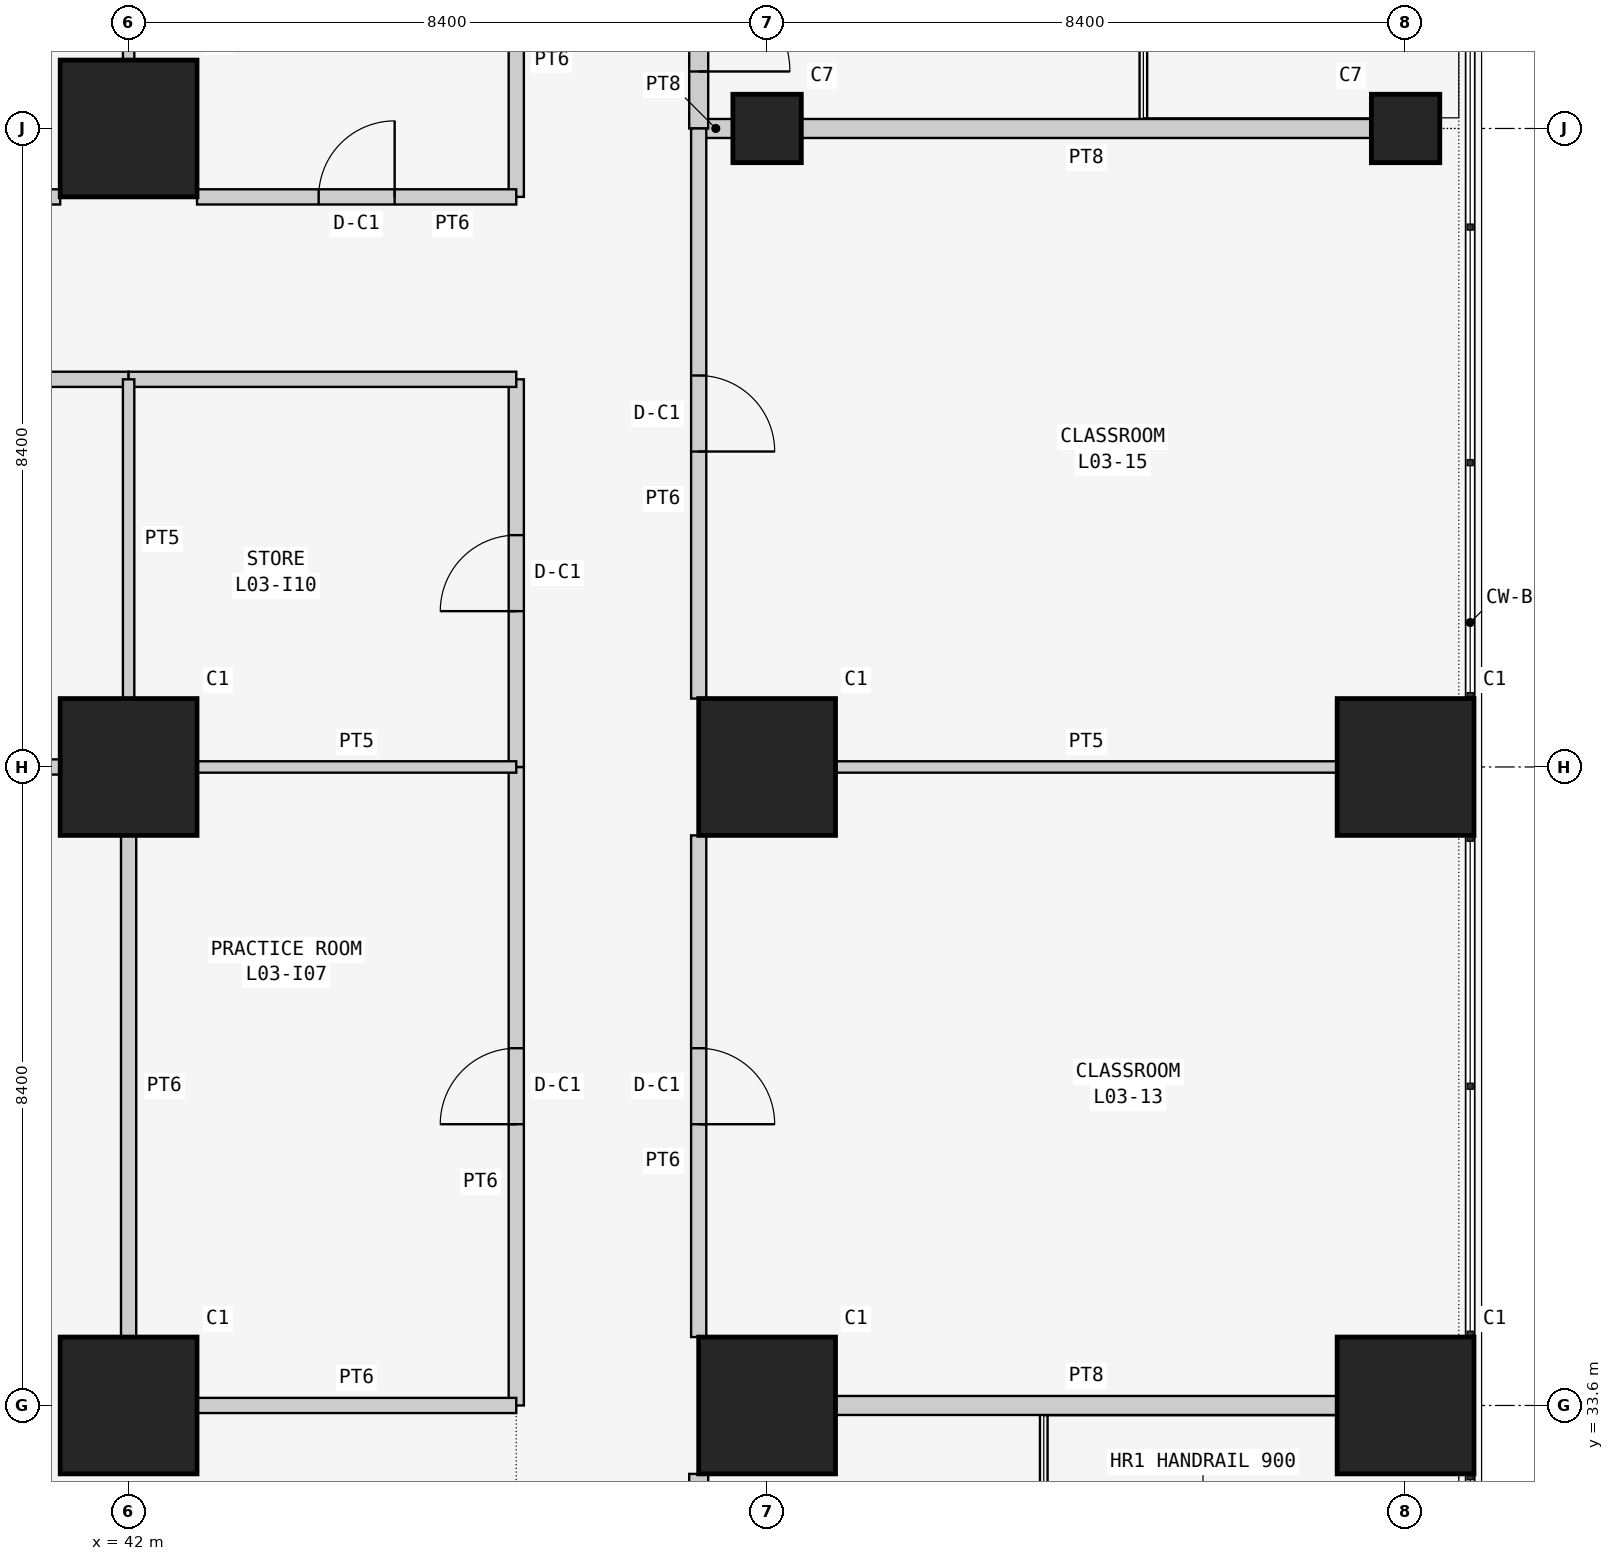
"""IFC4 building model, lengths in metres.
Left out: names, types, materials, properties, quantities, classifications, styles, units other than length and angle.
Written with IfcOpenShell. Run it as: python <this file> out.ifc"""

import sys

from ifc_helpers import new_model, si_unit, direction, frame, frame_2d, origin, origin_2d, place, context, subcontext, project, spatial, rectangle, extrude, element, fill, save


model = new_model("IFC4")
c1 = context("Model", 3, precision=1e-05, world=origin(), true_north=direction((0.0, 1.0)))
c2 = subcontext(c1, "Body", "Model", "MODEL_VIEW")
j1 = project(units=[si_unit("LENGTHUNIT", "METRE"), si_unit("PLANEANGLEUNIT", "RADIAN")], contexts=[c1])
p1 = place(None, origin())
s1 = spatial("IfcSite", under=j1, at=p1, CompositionType="ELEMENT")
p2 = place(p1, origin())
s2 = spatial("IfcBuilding", under=s1, at=p2, CompositionType="ELEMENT")
p3 = place(p2, frame((0.0, 0.0, 15.0)))
s3 = spatial("IfcBuildingStorey", under=s2, at=p3, CompositionType="ELEMENT", Elevation=15.0)
for number, where, z_axis, x_axis in (
    (1, (42.0, 33.6, 0.0), (0.0, 0.0, 1.0), (1.0, 0.0, 0.0)),
    (2, (42.0, 42.0, 0.0), (0.0, 0.0, 1.0), (1.0, 0.0, 0.0)),
    (3, (42.0, 50.4, 0.0), (0.0, 0.0, 1.0), (1.0, 0.0, 0.0)),
    (4, (50.4, 33.6, 0.0), (0.0, 0.0, 1.0), (1.0, 0.0, 0.0)),
    (5, (50.4, 42.0, 0.0), (0.0, 0.0, 1.0), (1.0, 0.0, 0.0)),
):
    element("IfcColumn", number, at=place(p3, frame(where, z_axis=z_axis, x_axis=x_axis)), inside=s3, PredefinedType="COLUMN", context=c2, shape_type="SweptSolid", body=[
        extrude(rectangle(XDim=1.8, YDim=1.8, at=origin_2d()), origin(), (0.0, 0.0, 1.0), 4.5),
    ])
p4 = place(p3, frame((50.4, 50.4, 0.0), z_axis=(0.0, 0.0, 1.0), x_axis=(1.0, 0.0, 0.0)))
e6 = element("IfcColumn", 6, at=p4, inside=s3, PredefinedType="COLUMN", context=c2, shape_type="SweptSolid", body=[
    extrude(rectangle(XDim=0.9, YDim=0.9, at=origin_2d()), origin(), (0.0, 0.0, 1.0), 4.5),
])
for number, where, z_axis, x_axis in (
    (7, (58.8, 33.6, 0.0), (0.0, 0.0, 1.0), (1.0, 0.0, 0.0)),
    (8, (58.8, 42.0, 0.0), (0.0, 0.0, 1.0), (1.0, 0.0, 0.0)),
):
    element("IfcColumn", number, at=place(p3, frame(where, z_axis=z_axis, x_axis=x_axis)), inside=s3, PredefinedType="COLUMN", context=c2, shape_type="SweptSolid", body=[
        extrude(rectangle(XDim=1.8, YDim=1.8, at=origin_2d()), origin(), (0.0, 0.0, 1.0), 4.5),
    ])
p5 = place(p3, frame((58.8, 50.4, 0.0), z_axis=(0.0, 0.0, 1.0), x_axis=(1.0, 0.0, 0.0)))
e9 = element("IfcColumn", 9, at=p5, inside=s3, PredefinedType="COLUMN", context=c2, shape_type="SweptSolid", body=[
    extrude(rectangle(XDim=0.9, YDim=0.9, at=origin_2d()), origin(), (0.0, 0.0, 1.0), 4.5),
])
p6 = place(p3, frame((51.3, 33.6, 0.0), z_axis=(0.0, 0.0, 1.0), x_axis=(1.0, 0.0, 0.0)))
e10 = element("IfcWall", 10, at=p6, inside=s3, PredefinedType="SOLIDWALL", context=c2, shape_type="SweptSolid", body=[
    extrude(rectangle(XDim=6.6, YDim=0.25, at=frame_2d((3.3, 0.0))), origin(), (0.0, 0.0, 1.0), 3.543),
])
p7 = place(p3, frame((49.5, 26.1, 0.0), z_axis=(0.0, 0.0, 1.0), x_axis=(0.0, 1.0, 0.0)))
e11 = element("IfcWall", 11, at=p7, inside=s3, PredefinedType="SOLIDWALL", context=c2, shape_type="SweptSolid", body=[
    extrude(rectangle(XDim=6.6, YDim=0.25, at=frame_2d((3.3, 0.0))), origin(), (0.0, 0.0, 1.0), 4.3),
])
p8 = place(p7, frame((2.0, 0.0, 0.0)))
e12 = element("IfcOpeningElement", 12, at=p8, cuts=e11, PredefinedType="OPENING", context=c2, shape_type="SweptSolid", body=[
    extrude(rectangle(XDim=2.6, YDim=2.4, at=frame_2d((1.3, 1.2))), frame((0.0, 0.135, 0.0), z_axis=(0.0, -1.0, 0.0), x_axis=(1.0, 0.0, 0.0)), (0.0, 0.0, 1.0), 0.27),
])
p9 = place(p3, frame((49.95, 50.4, 0.0), z_axis=(0.0, 0.0, 1.0), x_axis=(-1.0, 0.0, 0.0)))
e13 = element("IfcWall", 13, at=p9, inside=s3, PredefinedType="SOLIDWALL", context=c2, shape_type="SweptSolid", body=[
    extrude(rectangle(XDim=0.45, YDim=0.25, at=frame_2d((0.225, 0.0))), origin(), (0.0, 0.0, 1.0), 3.543),
])
p10 = place(p3, frame((58.35, 50.4, 0.0), z_axis=(0.0, 0.0, 1.0), x_axis=(-1.0, 0.0, 0.0)))
e14 = element("IfcWall", 14, at=p10, inside=s3, PredefinedType="SOLIDWALL", context=c2, shape_type="SweptSolid", body=[
    extrude(rectangle(XDim=7.5, YDim=0.25, at=frame_2d((3.75, 0.0))), origin(), (0.0, 0.0, 1.0), 3.543),
])
p11 = place(p3, frame((49.5, 50.4, 0.0), z_axis=(0.0, 0.0, 1.0), x_axis=(0.0, 1.0, 0.0)))
e15 = element("IfcWall", 15, at=p11, inside=s3, PredefinedType="SOLIDWALL", context=c2, shape_type="SweptSolid", body=[
    extrude(rectangle(XDim=2.7, YDim=0.25, at=frame_2d((1.35, 0.0))), origin(), (0.0, 0.0, 1.0), 4.3),
])
p12 = place(p11, frame((0.75, 0.0, 0.0)))
e16 = element("IfcOpeningElement", 16, at=p12, cuts=e15, PredefinedType="OPENING", context=c2, shape_type="SweptSolid", body=[
    extrude(rectangle(XDim=1.2, YDim=2.1, at=frame_2d((0.6, 1.05))), frame((0.0, 0.135, 0.0), z_axis=(0.0, -1.0, 0.0), x_axis=(1.0, 0.0, 0.0)), (0.0, 0.0, 1.0), 0.27),
])
p13 = place(p3, frame((51.3, 42.0, 0.0), z_axis=(0.0, 0.0, 1.0), x_axis=(1.0, 0.0, 0.0)))
e17 = element("IfcWall", 17, at=p13, inside=s3, PredefinedType="PARTITIONING", context=c2, shape_type="SweptSolid", body=[
    extrude(rectangle(XDim=6.6, YDim=0.15, at=frame_2d((3.3, 0.0))), origin(), (0.0, 0.0, 1.0), 3.543),
])
p14 = place(p3, frame((49.5, 34.5, 0.0), z_axis=(0.0, 0.0, 1.0), x_axis=(0.0, 1.0, 0.0)))
e18 = element("IfcWall", 18, at=p14, inside=s3, PredefinedType="PARTITIONING", context=c2, shape_type="SweptSolid", body=[
    extrude(rectangle(XDim=6.6, YDim=0.2, at=frame_2d((3.3, 0.0))), origin(), (0.0, 0.0, 1.0), 4.3),
])
p15 = place(p14, frame((2.8, 0.0, 0.0)))
e19 = element("IfcOpeningElement", 19, at=p15, cuts=e18, PredefinedType="OPENING", context=c2, shape_type="SweptSolid", body=[
    extrude(rectangle(XDim=1.0, YDim=2.1, at=frame_2d((0.5, 1.05))), frame((0.0, 0.11, 0.0), z_axis=(0.0, -1.0, 0.0), x_axis=(1.0, 0.0, 0.0)), (0.0, 0.0, 1.0), 0.22),
])
p16 = place(p3, frame((49.5, 42.9, 0.0), z_axis=(0.0, 0.0, 1.0), x_axis=(0.0, 1.0, 0.0)))
e20 = element("IfcWall", 20, at=p16, inside=s3, PredefinedType="PARTITIONING", context=c2, shape_type="SweptSolid", body=[
    extrude(rectangle(XDim=7.5, YDim=0.2, at=frame_2d((3.75, 0.0))), origin(), (0.0, 0.0, 1.0), 4.3),
])
p17 = place(p16, frame((3.25, 0.0, 0.0)))
e21 = element("IfcOpeningElement", 21, at=p17, cuts=e20, PredefinedType="OPENING", context=c2, shape_type="SweptSolid", body=[
    extrude(rectangle(XDim=1.0, YDim=2.1, at=frame_2d((0.5, 1.05))), frame((0.0, 0.11, 0.0), z_axis=(0.0, -1.0, 0.0), x_axis=(1.0, 0.0, 0.0)), (0.0, 0.0, 1.0), 0.22),
])
p18 = place(p3, frame((42.0, 57.9, 0.0), z_axis=(0.0, 0.0, 1.0), x_axis=(0.0, -1.0, 0.0)))
e22 = element("IfcWall", 22, at=p18, inside=s3, PredefinedType="PARTITIONING", context=c2, shape_type="SweptSolid", body=[
    extrude(rectangle(XDim=6.6, YDim=0.15, at=frame_2d((3.3, 0.0))), origin(), (0.0, 0.0, 1.0), 3.543),
])
p19 = place(p3, frame((41.1, 49.5, 0.0), z_axis=(0.0, 0.0, 1.0), x_axis=(-1.0, 0.0, 0.0)))
e23 = element("IfcWall", 23, at=p19, inside=s3, PredefinedType="PARTITIONING", context=c2, shape_type="SweptSolid", body=[
    extrude(rectangle(XDim=6.6, YDim=0.2, at=frame_2d((3.3, 0.0))), origin(), (0.0, 0.0, 1.0), 4.3),
])
p20 = place(p19, frame((2.8, 0.0, 0.0)))
e24 = element("IfcOpeningElement", 24, at=p20, cuts=e23, PredefinedType="OPENING", context=c2, shape_type="SweptSolid", body=[
    extrude(rectangle(XDim=1.0, YDim=2.1, at=frame_2d((0.5, 1.05))), frame((0.0, 0.11, 0.0), z_axis=(0.0, -1.0, 0.0), x_axis=(1.0, 0.0, 0.0)), (0.0, 0.0, 1.0), 0.22),
])
p21 = place(p3, frame((47.1, 53.1, 0.0), z_axis=(0.0, 0.0, 1.0), x_axis=(0.0, -1.0, 0.0)))
e25 = element("IfcWall", 25, at=p21, inside=s3, PredefinedType="PARTITIONING", context=c2, shape_type="SweptSolid", body=[
    extrude(rectangle(XDim=3.6, YDim=0.2, at=frame_2d((1.8, 0.0))), origin(), (0.0, 0.0, 1.0), 4.3),
])
p22 = place(p3, frame((47.1, 49.5, 0.0), z_axis=(0.0, 0.0, 1.0), x_axis=(-1.0, 0.0, 0.0)))
e26 = element("IfcWall", 26, at=p22, inside=s3, PredefinedType="PARTITIONING", context=c2, shape_type="SweptSolid", body=[
    extrude(rectangle(XDim=4.2, YDim=0.2, at=frame_2d((2.1, 0.0))), origin(), (0.0, 0.0, 1.0), 4.3),
])
p23 = place(p22, frame((1.6, 0.0, 0.0)))
e27 = element("IfcOpeningElement", 27, at=p23, cuts=e26, PredefinedType="OPENING", context=c2, shape_type="SweptSolid", body=[
    extrude(rectangle(XDim=1.0, YDim=2.1, at=frame_2d((0.5, 1.05))), frame((0.0, 0.11, 0.0), z_axis=(0.0, -1.0, 0.0), x_axis=(1.0, 0.0, 0.0)), (0.0, 0.0, 1.0), 0.22),
])
p24 = place(p3, frame((47.1, 33.6, 0.0), z_axis=(0.0, 0.0, 1.0), x_axis=(0.0, 1.0, 0.0)))
e28 = element("IfcWall", 28, at=p24, inside=s3, PredefinedType="PARTITIONING", context=c2, shape_type="SweptSolid", body=[
    extrude(rectangle(XDim=8.4, YDim=0.2, at=frame_2d((4.2, 0.0))), origin(), (0.0, 0.0, 1.0), 4.3),
])
p25 = place(p24, frame((3.7, 0.0, 0.0)))
e29 = element("IfcOpeningElement", 29, at=p25, cuts=e28, PredefinedType="OPENING", context=c2, shape_type="SweptSolid", body=[
    extrude(rectangle(XDim=1.0, YDim=2.1, at=frame_2d((0.5, 1.05))), frame((0.0, 0.11, 0.0), z_axis=(0.0, -1.0, 0.0), x_axis=(1.0, 0.0, 0.0)), (0.0, 0.0, 1.0), 0.22),
])
p26 = place(p3, frame((42.0, 47.1, 0.0), z_axis=(0.0, 0.0, 1.0), x_axis=(-1.0, 0.0, 0.0)))
e30 = element("IfcWall", 30, at=p26, inside=s3, PredefinedType="PARTITIONING", context=c2, shape_type="SweptSolid", body=[
    extrude(rectangle(XDim=16.8, YDim=0.2, at=frame_2d((8.4, 0.0))), origin(), (0.0, 0.0, 1.0), 4.3),
])
p27 = place(p26, frame((7.9, 0.0, 0.0)))
e31 = element("IfcOpeningElement", 31, at=p27, cuts=e30, PredefinedType="OPENING", context=c2, shape_type="SweptSolid", body=[
    extrude(rectangle(XDim=1.0, YDim=2.1, at=frame_2d((0.5, 1.05))), frame((0.0, 0.11, 0.0), z_axis=(0.0, -1.0, 0.0), x_axis=(1.0, 0.0, 0.0)), (0.0, 0.0, 1.0), 0.22),
])
p28 = place(p3, frame((47.1, 42.0, 0.0), z_axis=(0.0, 0.0, 1.0), x_axis=(0.0, 1.0, 0.0)))
e32 = element("IfcWall", 32, at=p28, inside=s3, PredefinedType="PARTITIONING", context=c2, shape_type="SweptSolid", body=[
    extrude(rectangle(XDim=5.1, YDim=0.2, at=frame_2d((2.55, 0.0))), origin(), (0.0, 0.0, 1.0), 4.3),
])
p29 = place(p28, frame((2.05, 0.0, 0.0)))
e33 = element("IfcOpeningElement", 33, at=p29, cuts=e32, PredefinedType="OPENING", context=c2, shape_type="SweptSolid", body=[
    extrude(rectangle(XDim=1.0, YDim=2.1, at=frame_2d((0.5, 1.05))), frame((0.0, 0.11, 0.0), z_axis=(0.0, -1.0, 0.0), x_axis=(1.0, 0.0, 0.0)), (0.0, 0.0, 1.0), 0.22),
])
p30 = place(p3, frame((47.1, 47.1, 0.0), z_axis=(0.0, 0.0, 1.0), x_axis=(-1.0, 0.0, 0.0)))
e34 = element("IfcWall", 34, at=p30, inside=s3, PredefinedType="PARTITIONING", context=c2, shape_type="SweptSolid", body=[
    extrude(rectangle(XDim=5.1, YDim=0.2, at=frame_2d((2.55, 0.0))), origin(), (0.0, 0.0, 1.0), 4.3),
])
p31 = place(p3, frame((42.0, 41.1, 0.0), z_axis=(0.0, 0.0, 1.0), x_axis=(0.0, -1.0, 0.0)))
e35 = element("IfcWall", 35, at=p31, inside=s3, PredefinedType="PARTITIONING", context=c2, shape_type="SweptSolid", body=[
    extrude(rectangle(XDim=6.6, YDim=0.2, at=frame_2d((3.3, 0.0))), origin(), (0.0, 0.0, 1.0), 3.543),
])
p32 = place(p3, frame((42.9, 33.6, 0.0), z_axis=(0.0, 0.0, 1.0), x_axis=(1.0, 0.0, 0.0)))
e36 = element("IfcWall", 36, at=p32, inside=s3, PredefinedType="PARTITIONING", context=c2, shape_type="SweptSolid", body=[
    extrude(rectangle(XDim=4.2, YDim=0.2, at=frame_2d((2.1, 0.0))), origin(), (0.0, 0.0, 1.0), 3.543),
])
p33 = place(p3, frame((34.5, 42.0, 0.0), z_axis=(0.0, 0.0, 1.0), x_axis=(1.0, 0.0, 0.0)))
e37 = element("IfcWall", 37, at=p33, inside=s3, PredefinedType="PARTITIONING", context=c2, shape_type="SweptSolid", body=[
    extrude(rectangle(XDim=6.6, YDim=0.2, at=frame_2d((3.3, 0.0))), origin(), (0.0, 0.0, 1.0), 3.543),
])
for number, where, z_axis, x_axis in (
    (38, (42.9, 42.0, 0.0), (0.0, 0.0, 1.0), (1.0, 0.0, 0.0)),
    (39, (42.0, 47.1, 0.0), (0.0, 0.0, 1.0), (0.0, -1.0, 0.0)),
):
    element("IfcWall", number, at=place(p3, frame(where, z_axis=z_axis, x_axis=x_axis)), inside=s3, PredefinedType="PARTITIONING", context=c2, shape_type="SweptSolid", body=[
        extrude(rectangle(XDim=4.2, YDim=0.15, at=frame_2d((2.1, 0.0))), origin(), (0.0, 0.0, 1.0), 3.543),
    ])
p34 = place(p12, frame((1.2, 0.0, 0.0), z_axis=(0.0, 0.0, 1.0), x_axis=(-1.0, 0.0, 0.0)))
e40 = element("IfcDoor", 40, at=p34, inside=s3, OperationType="SINGLE_SWING_RIGHT", PredefinedType="DOOR", context=c2, shape_type="SweptSolid", body=[
    extrude(rectangle(XDim=1.2, YDim=2.1, at=frame_2d((0.6, 1.05))), frame((0.0, 0.025, 0.0), z_axis=(0.0, -1.0, 0.0), x_axis=(1.0, 0.0, 0.0)), (0.0, 0.0, 1.0), 0.05),
])
fill(e16, e40)
p35 = place(p15, frame((1.0, 0.0, 0.0), z_axis=(0.0, 0.0, 1.0), x_axis=(-1.0, 0.0, 0.0)))
e41 = element("IfcDoor", 41, at=p35, inside=s3, OperationType="SINGLE_SWING_RIGHT", PredefinedType="DOOR", context=c2, shape_type="SweptSolid", body=[
    extrude(rectangle(XDim=1.0, YDim=2.1, at=frame_2d((0.5, 1.05))), frame((0.0, 0.025, 0.0), z_axis=(0.0, -1.0, 0.0), x_axis=(1.0, 0.0, 0.0)), (0.0, 0.0, 1.0), 0.05),
])
fill(e19, e41)
p36 = place(p17, frame((1.0, 0.0, 0.0), z_axis=(0.0, 0.0, 1.0), x_axis=(-1.0, 0.0, 0.0)))
e42 = element("IfcDoor", 42, at=p36, inside=s3, OperationType="SINGLE_SWING_RIGHT", PredefinedType="DOOR", context=c2, shape_type="SweptSolid", body=[
    extrude(rectangle(XDim=1.0, YDim=2.1, at=frame_2d((0.5, 1.05))), frame((0.0, 0.025, 0.0), z_axis=(0.0, -1.0, 0.0), x_axis=(1.0, 0.0, 0.0)), (0.0, 0.0, 1.0), 0.05),
])
fill(e21, e42)
p37 = place(p23, frame((1.0, 0.0, 0.0), z_axis=(0.0, 0.0, 1.0), x_axis=(-1.0, 0.0, 0.0)))
e43 = element("IfcDoor", 43, at=p37, inside=s3, OperationType="SINGLE_SWING_RIGHT", PredefinedType="DOOR", context=c2, shape_type="SweptSolid", body=[
    extrude(rectangle(XDim=1.0, YDim=2.1, at=frame_2d((0.5, 1.05))), frame((0.0, 0.025, 0.0), z_axis=(0.0, -1.0, 0.0), x_axis=(1.0, 0.0, 0.0)), (0.0, 0.0, 1.0), 0.05),
])
fill(e27, e43)
p38 = place(p25, origin())
e44 = element("IfcDoor", 44, at=p38, inside=s3, OperationType="SINGLE_SWING_LEFT", PredefinedType="DOOR", context=c2, shape_type="SweptSolid", body=[
    extrude(rectangle(XDim=1.0, YDim=2.1, at=frame_2d((0.5, 1.05))), frame((0.0, 0.025, 0.0), z_axis=(0.0, -1.0, 0.0), x_axis=(1.0, 0.0, 0.0)), (0.0, 0.0, 1.0), 0.05),
])
fill(e29, e44)
p39 = place(p29, origin())
e45 = element("IfcDoor", 45, at=p39, inside=s3, OperationType="SINGLE_SWING_LEFT", PredefinedType="DOOR", context=c2, shape_type="SweptSolid", body=[
    extrude(rectangle(XDim=1.0, YDim=2.1, at=frame_2d((0.5, 1.05))), frame((0.0, 0.025, 0.0), z_axis=(0.0, -1.0, 0.0), x_axis=(1.0, 0.0, 0.0)), (0.0, 0.0, 1.0), 0.05),
])
fill(e33, e45)
save(model, sys.argv[1])
